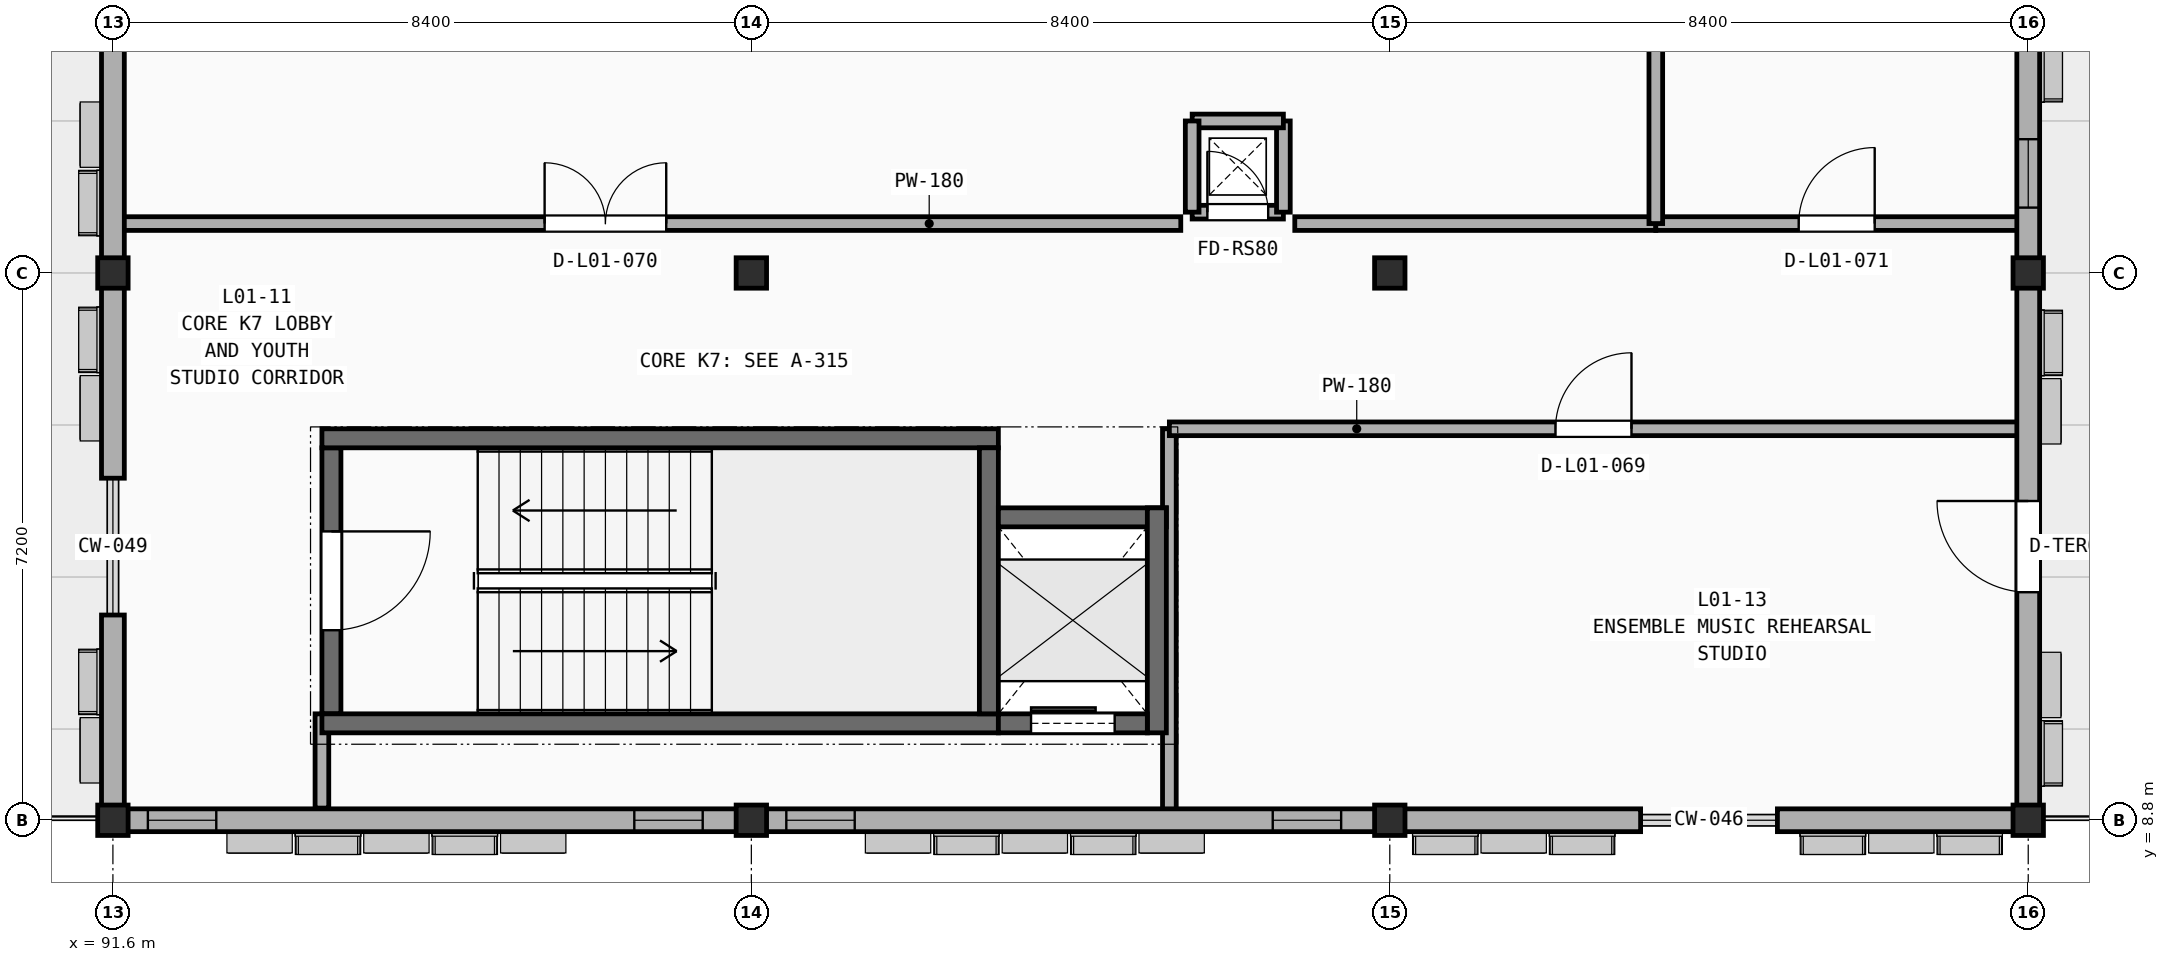
"""IFC4 building model, lengths in metres.
Left out: names, types, materials, properties, quantities, classifications, styles, units other than length and angle.
Written with IfcOpenShell. Run it as: python <this file> out.ifc"""

import sys

from ifc_helpers import new_model, si_unit, direction, frame, frame_2d, origin, origin_2d, place, context, subcontext, project, spatial, rectangle, extrude, element, fill, save


model = new_model("IFC4")
c1 = context("Model", 3, precision=1e-05, world=origin(), true_north=direction((0.0, 1.0)))
c2 = subcontext(c1, "Body", "Model", "MODEL_VIEW")
j1 = project(units=[si_unit("LENGTHUNIT", "METRE"), si_unit("PLANEANGLEUNIT", "RADIAN")], contexts=[c1])
p1 = place(None, origin())
s1 = spatial("IfcSite", under=j1, at=p1, CompositionType="ELEMENT")
p2 = place(p1, origin())
s2 = spatial("IfcBuilding", under=s1, at=p2, CompositionType="ELEMENT")
p3 = place(p2, frame((0.0, 0.0, 5.4)))
s3 = spatial("IfcBuildingStorey", under=s2, at=p3, CompositionType="ELEMENT", Elevation=5.4)
for number, where, z_axis, x_axis in (
    (1, (91.6, 8.8, 0.0), (0.0, 0.0, 1.0), (1.0, 0.0, 0.0)),
    (2, (91.6, 16.0, 0.0), (0.0, 0.0, 1.0), (1.0, 0.0, 0.0)),
    (3, (100.0, 8.8, 0.0), (0.0, 0.0, 1.0), (1.0, 0.0, 0.0)),
    (4, (100.0, 16.0, 0.0), (0.0, 0.0, 1.0), (1.0, 0.0, 0.0)),
    (5, (108.4, 8.8, 0.0), (0.0, 0.0, 1.0), (1.0, 0.0, 0.0)),
    (6, (108.4, 16.0, 0.0), (0.0, 0.0, 1.0), (1.0, 0.0, 0.0)),
    (7, (116.8, 8.8, 0.0), (0.0, 0.0, 1.0), (1.0, 0.0, 0.0)),
    (8, (116.8, 16.0, 0.0), (0.0, 0.0, 1.0), (1.0, 0.0, 0.0)),
):
    element("IfcColumn", number, at=place(p3, frame(where, z_axis=z_axis, x_axis=x_axis)), inside=s3, PredefinedType="COLUMN", context=c2, shape_type="SweptSolid", body=[
        extrude(rectangle(XDim=0.4, YDim=0.4, at=origin_2d()), origin(), (0.0, 0.0, 1.0), 4.2),
    ])
p4 = place(p3, frame((94.35, 8.96, 0.0), z_axis=(0.0, 0.0, 1.0), x_axis=(0.0, 1.0, 0.0)))
e9 = element("IfcWall", 9, at=p4, inside=s3, PredefinedType="PARTITIONING", context=c2, shape_type="SweptSolid", body=[
    extrude(rectangle(XDim=1.24, YDim=0.18, at=frame_2d((0.62, 0.0))), origin(), (0.0, 0.0, 1.0), 3.52),
])
p5 = place(p3, frame((105.5, 8.94, 0.0), z_axis=(0.0, 0.0, 1.0), x_axis=(0.0, 1.0, 0.0)))
e10 = element("IfcWall", 10, at=p5, inside=s3, PredefinedType="PARTITIONING", context=c2, shape_type="SweptSolid", body=[
    extrude(rectangle(XDim=5.01, YDim=0.18, at=frame_2d((2.505, 0.0))), origin(), (0.0, 0.0, 1.0), 3.52),
])
p6 = place(p3, frame((105.5, 13.95, 0.0), z_axis=(0.0, 0.0, 1.0), x_axis=(1.0, 0.0, 0.0)))
e11 = element("IfcWall", 11, at=p6, inside=s3, PredefinedType="PARTITIONING", context=c2, shape_type="SweptSolid", body=[
    extrude(rectangle(XDim=11.16, YDim=0.18, at=frame_2d((5.58, 0.0))), origin(), (0.0, 0.0, 1.0), 3.21),
])
p7 = place(p6, frame((5.08, 0.0, -0.01)))
e12 = element("IfcOpeningElement", 12, at=p7, cuts=e11, PredefinedType="OPENING", context=c2, shape_type="SweptSolid", body=[
    extrude(rectangle(XDim=1.0, YDim=2.16, at=frame_2d((0.5, 1.08))), frame((0.0, 0.1, 0.0), z_axis=(0.0, -1.0, 0.0), x_axis=(1.0, 0.0, 0.0)), (0.0, 0.0, 1.0), 0.2),
])
p8 = place(p3, frame((91.74, 16.65, 0.0), z_axis=(0.0, 0.0, 1.0), x_axis=(1.0, 0.0, 0.0)))
e13 = element("IfcWall", 13, at=p8, inside=s3, PredefinedType="PARTITIONING", context=c2, shape_type="SweptSolid", body=[
    extrude(rectangle(XDim=13.91, YDim=0.18, at=frame_2d((6.955, 0.0))), origin(), (0.0, 0.0, 1.0), 3.21),
])
p9 = place(p8, frame((5.54, 0.0, -0.01)))
e14 = element("IfcOpeningElement", 14, at=p9, cuts=e13, PredefinedType="OPENING", context=c2, shape_type="SweptSolid", body=[
    extrude(rectangle(XDim=1.6, YDim=2.21, at=frame_2d((0.8, 1.105))), frame((0.0, 0.1, 0.0), z_axis=(0.0, -1.0, 0.0), x_axis=(1.0, 0.0, 0.0)), (0.0, 0.0, 1.0), 0.2),
])
p10 = place(p3, frame((107.15, 16.65, 0.0), z_axis=(0.0, 0.0, 1.0), x_axis=(1.0, 0.0, 0.0)))
e15 = element("IfcWall", 15, at=p10, inside=s3, PredefinedType="PARTITIONING", context=c2, shape_type="SweptSolid", body=[
    extrude(rectangle(XDim=4.75, YDim=0.18, at=frame_2d((2.375, 0.0))), origin(), (0.0, 0.0, 1.0), 3.37),
])
p11 = place(p3, frame((111.9, 16.65, 0.0), z_axis=(0.0, 0.0, 1.0), x_axis=(1.0, 0.0, 0.0)))
e16 = element("IfcWall", 16, at=p11, inside=s3, PredefinedType="PARTITIONING", context=c2, shape_type="SweptSolid", body=[
    extrude(rectangle(XDim=4.76, YDim=0.18, at=frame_2d((2.38, 0.0))), origin(), (0.0, 0.0, 1.0), 3.21),
])
p12 = place(p11, frame((1.88, 0.0, -0.01)))
e17 = element("IfcOpeningElement", 17, at=p12, cuts=e16, PredefinedType="OPENING", context=c2, shape_type="SweptSolid", body=[
    extrude(rectangle(XDim=1.0, YDim=2.16, at=frame_2d((0.5, 1.08))), frame((0.0, 0.1, 0.0), z_axis=(0.0, -1.0, 0.0), x_axis=(1.0, 0.0, 0.0)), (0.0, 0.0, 1.0), 0.2),
])
p13 = place(p3, frame((111.9, 16.65, 0.0), z_axis=(0.0, 0.0, 1.0), x_axis=(0.0, 1.0, 0.0)))
e18 = element("IfcWall", 18, at=p13, inside=s3, PredefinedType="PARTITIONING", context=c2, shape_type="SweptSolid", body=[
    extrude(rectangle(XDim=6.41, YDim=0.18, at=frame_2d((3.205, 0.0))), origin(), (0.0, 0.0, 1.0), 3.52),
])
p14 = place(p3, frame((91.6, 8.8, 0.0), z_axis=(0.0, 0.0, 1.0), x_axis=(1.0, 0.0, 0.0)))
e19 = element("IfcWall", 19, at=p14, inside=s3, PredefinedType="SOLIDWALL", context=c2, shape_type="SweptSolid", body=[
    extrude(rectangle(XDim=8.4, YDim=0.3, at=frame_2d((4.2, 0.0))), origin(), (0.0, 0.0, 1.0), 3.21),
])
p15 = place(p14, frame((0.46, 0.0, 0.85)))
e20 = element("IfcOpeningElement", 20, at=p15, cuts=e19, PredefinedType="OPENING", context=c2, shape_type="SweptSolid", body=[
    extrude(rectangle(XDim=0.9, YDim=2.15, at=frame_2d((0.45, 1.075))), frame((0.0, 0.16, 0.0), z_axis=(0.0, -1.0, 0.0), x_axis=(1.0, 0.0, 0.0)), (0.0, 0.0, 1.0), 0.32),
])
p16 = place(p14, frame((6.86, 0.0, 0.85)))
e21 = element("IfcOpeningElement", 21, at=p16, cuts=e19, PredefinedType="OPENING", context=c2, shape_type="SweptSolid", body=[
    extrude(rectangle(XDim=0.9, YDim=2.15, at=frame_2d((0.45, 1.075))), frame((0.0, 0.16, 0.0), z_axis=(0.0, -1.0, 0.0), x_axis=(1.0, 0.0, 0.0)), (0.0, 0.0, 1.0), 0.32),
])
p17 = place(p3, frame((100.0, 8.8, 0.0), z_axis=(0.0, 0.0, 1.0), x_axis=(1.0, 0.0, 0.0)))
e22 = element("IfcWall", 22, at=p17, inside=s3, PredefinedType="SOLIDWALL", context=c2, shape_type="SweptSolid", body=[
    extrude(rectangle(XDim=8.4, YDim=0.3, at=frame_2d((4.2, 0.0))), origin(), (0.0, 0.0, 1.0), 3.37),
])
p18 = place(p17, frame((0.46, 0.0, 0.85)))
e23 = element("IfcOpeningElement", 23, at=p18, cuts=e22, PredefinedType="OPENING", context=c2, shape_type="SweptSolid", body=[
    extrude(rectangle(XDim=0.9, YDim=2.15, at=frame_2d((0.45, 1.075))), frame((0.0, 0.16, 0.0), z_axis=(0.0, -1.0, 0.0), x_axis=(1.0, 0.0, 0.0)), (0.0, 0.0, 1.0), 0.32),
])
p19 = place(p17, frame((6.86, 0.0, 0.85)))
e24 = element("IfcOpeningElement", 24, at=p19, cuts=e22, PredefinedType="OPENING", context=c2, shape_type="SweptSolid", body=[
    extrude(rectangle(XDim=0.9, YDim=2.15, at=frame_2d((0.45, 1.075))), frame((0.0, 0.16, 0.0), z_axis=(0.0, -1.0, 0.0), x_axis=(1.0, 0.0, 0.0)), (0.0, 0.0, 1.0), 0.32),
])
for number, where, z_axis, x_axis in (
    (25, (108.4, 8.8, 0.0), (0.0, 0.0, 1.0), (1.0, 0.0, 0.0)),
    (26, (113.5, 8.8, 0.0), (0.0, 0.0, 1.0), (1.0, 0.0, 0.0)),
):
    element("IfcWall", number, at=place(p3, frame(where, z_axis=z_axis, x_axis=x_axis)), inside=s3, PredefinedType="SOLIDWALL", context=c2, shape_type="SweptSolid", body=[
        extrude(rectangle(XDim=3.3, YDim=0.3, at=frame_2d((1.65, 0.0))), origin(), (0.0, 0.0, 1.0), 3.21),
    ])
for number, where, z_axis, x_axis in (
    (27, (91.6, 16.0, 0.0), (0.0, 0.0, 1.0), (0.0, -1.0, 0.0)),
    (28, (91.6, 11.5, 0.0), (0.0, 0.0, 1.0), (0.0, -1.0, 0.0)),
):
    element("IfcWall", number, at=place(p3, frame(where, z_axis=z_axis, x_axis=x_axis)), inside=s3, PredefinedType="SOLIDWALL", context=c2, shape_type="SweptSolid", body=[
        extrude(rectangle(XDim=2.7, YDim=0.3, at=frame_2d((1.35, 0.0))), origin(), (0.0, 0.0, 1.0), 3.21),
    ])
p20 = place(p3, frame((91.6, 23.2, 0.0), z_axis=(0.0, 0.0, 1.0), x_axis=(0.0, -1.0, 0.0)))
e29 = element("IfcWall", 29, at=p20, inside=s3, PredefinedType="SOLIDWALL", context=c2, shape_type="SweptSolid", body=[
    extrude(rectangle(XDim=7.2, YDim=0.3, at=frame_2d((3.6, 0.0))), origin(), (0.0, 0.0, 1.0), 3.21),
])
p21 = place(p20, frame((3.0, 0.0, -0.01)))
e30 = element("IfcOpeningElement", 30, at=p21, cuts=e29, PredefinedType="OPENING", context=c2, shape_type="SweptSolid", body=[
    extrude(rectangle(XDim=1.2, YDim=2.21, at=frame_2d((0.6, 1.105))), frame((0.0, 0.16, 0.0), z_axis=(0.0, -1.0, 0.0), x_axis=(1.0, 0.0, 0.0)), (0.0, 0.0, 1.0), 0.32),
])
p22 = place(p3, frame((116.8, 8.8, 0.0), z_axis=(0.0, 0.0, 1.0), x_axis=(0.0, 1.0, 0.0)))
e31 = element("IfcWall", 31, at=p22, inside=s3, PredefinedType="SOLIDWALL", context=c2, shape_type="SweptSolid", body=[
    extrude(rectangle(XDim=7.2, YDim=0.3, at=frame_2d((3.6, 0.0))), origin(), (0.0, 0.0, 1.0), 3.21),
])
p23 = place(p22, frame((3.0, 0.0, -0.01)))
e32 = element("IfcOpeningElement", 32, at=p23, cuts=e31, PredefinedType="OPENING", context=c2, shape_type="SweptSolid", body=[
    extrude(rectangle(XDim=1.2, YDim=2.21, at=frame_2d((0.6, 1.105))), frame((0.0, 0.16, 0.0), z_axis=(0.0, -1.0, 0.0), x_axis=(1.0, 0.0, 0.0)), (0.0, 0.0, 1.0), 0.32),
])
p24 = place(p3, frame((116.8, 16.0, 0.0), z_axis=(0.0, 0.0, 1.0), x_axis=(0.0, 1.0, 0.0)))
e33 = element("IfcWall", 33, at=p24, inside=s3, PredefinedType="SOLIDWALL", context=c2, shape_type="SweptSolid", body=[
    extrude(rectangle(XDim=7.2, YDim=0.3, at=frame_2d((3.6, 0.0))), origin(), (0.0, 0.0, 1.0), 3.21),
])
p25 = place(p24, frame((0.86, 0.0, 0.85)))
e34 = element("IfcOpeningElement", 34, at=p25, cuts=e33, PredefinedType="OPENING", context=c2, shape_type="SweptSolid", body=[
    extrude(rectangle(XDim=0.9, YDim=2.15, at=frame_2d((0.45, 1.075))), frame((0.0, 0.16, 0.0), z_axis=(0.0, -1.0, 0.0), x_axis=(1.0, 0.0, 0.0)), (0.0, 0.0, 1.0), 0.32),
])
p26 = place(p24, frame((5.66, 0.0, 0.85)))
e35 = element("IfcOpeningElement", 35, at=p26, cuts=e33, PredefinedType="OPENING", context=c2, shape_type="SweptSolid", body=[
    extrude(rectangle(XDim=0.9, YDim=2.15, at=frame_2d((0.45, 1.075))), frame((0.0, 0.16, 0.0), z_axis=(0.0, -1.0, 0.0), x_axis=(1.0, 0.0, 0.0)), (0.0, 0.0, 1.0), 0.32),
])
p27 = place(p3, frame((94.475, 13.7, 0.0), z_axis=(0.0, 0.0, 1.0), x_axis=(0.0, -1.0, 0.0)))
e36 = element("IfcWall", 36, at=p27, inside=s3, PredefinedType="SHEAR", context=c2, shape_type="SweptSolid", body=[
    extrude(rectangle(XDim=3.5, YDim=0.25, at=frame_2d((1.75, 0.0))), origin(), (0.0, 0.0, 1.0), 4.2),
])
p28 = place(p27, frame((1.1, 0.0, -0.01)))
e37 = element("IfcOpeningElement", 37, at=p28, cuts=e36, PredefinedType="OPENING", context=c2, shape_type="SweptSolid", body=[
    extrude(rectangle(XDim=1.3, YDim=2.16, at=frame_2d((0.65, 1.08))), frame((0.0, 0.135, 0.0), z_axis=(0.0, -1.0, 0.0), x_axis=(1.0, 0.0, 0.0)), (0.0, 0.0, 1.0), 0.27),
])
for number, where, z_axis, x_axis in (
    (38, (94.35, 10.075, 0.0), (0.0, 0.0, 1.0), (1.0, 0.0, 0.0)),
    (39, (94.35, 13.825, 0.0), (0.0, 0.0, 1.0), (1.0, 0.0, 0.0)),
):
    element("IfcWall", number, at=place(p3, frame(where, z_axis=z_axis, x_axis=x_axis)), inside=s3, PredefinedType="SHEAR", context=c2, shape_type="SweptSolid", body=[
        extrude(rectangle(XDim=8.9, YDim=0.25, at=frame_2d((4.45, 0.0))), origin(), (0.0, 0.0, 1.0), 4.2),
    ])
p29 = place(p3, frame((103.125, 10.2, 0.0), z_axis=(0.0, 0.0, 1.0), x_axis=(0.0, 1.0, 0.0)))
e40 = element("IfcWall", 40, at=p29, inside=s3, PredefinedType="SHEAR", context=c2, shape_type="SweptSolid", body=[
    extrude(rectangle(XDim=3.5, YDim=0.25, at=frame_2d((1.75, 0.0))), origin(), (0.0, 0.0, 1.0), 4.2),
])
p30 = place(p3, frame((103.25, 12.785, 0.0), z_axis=(0.0, 0.0, 1.0), x_axis=(1.0, 0.0, 0.0)))
e41 = element("IfcWall", 41, at=p30, inside=s3, PredefinedType="SHEAR", context=c2, shape_type="SweptSolid", body=[
    extrude(rectangle(XDim=2.21, YDim=0.25, at=frame_2d((1.105, 0.0))), origin(), (0.0, 0.0, 1.0), 4.2),
])
p31 = place(p3, frame((105.335, 9.95, 0.0), z_axis=(0.0, 0.0, 1.0), x_axis=(0.0, 1.0, 0.0)))
e42 = element("IfcWall", 42, at=p31, inside=s3, PredefinedType="SHEAR", context=c2, shape_type="SweptSolid", body=[
    extrude(rectangle(XDim=2.96, YDim=0.25, at=frame_2d((1.48, 0.0))), origin(), (0.0, 0.0, 1.0), 4.2),
])
p32 = place(p3, frame((103.25, 10.075, 0.0), z_axis=(0.0, 0.0, 1.0), x_axis=(1.0, 0.0, 0.0)))
e43 = element("IfcWall", 43, at=p32, inside=s3, PredefinedType="SHEAR", context=c2, shape_type="SweptSolid", body=[
    extrude(rectangle(XDim=1.96, YDim=0.25, at=frame_2d((0.98, 0.0))), origin(), (0.0, 0.0, 1.0), 4.2),
])
p33 = place(p32, frame((0.43, 0.0, -0.01)))
e44 = element("IfcOpeningElement", 44, at=p33, cuts=e43, PredefinedType="OPENING", context=c2, shape_type="SweptSolid", body=[
    extrude(rectangle(XDim=1.1, YDim=2.16, at=frame_2d((0.55, 1.08))), frame((0.0, 0.135, 0.0), z_axis=(0.0, -1.0, 0.0), x_axis=(1.0, 0.0, 0.0)), (0.0, 0.0, 1.0), 0.27),
])
p34 = place(p3, frame((105.8, 16.8, 0.0), z_axis=(0.0, 0.0, 1.0), x_axis=(1.0, 0.0, 0.0)))
e45 = element("IfcWall", 45, at=p34, inside=s3, PredefinedType="SOLIDWALL", context=c2, shape_type="SweptSolid", body=[
    extrude(rectangle(XDim=1.2, YDim=0.18, at=frame_2d((0.6, 0.0))), origin(), (0.0, 0.0, 1.0), 3.97),
])
p35 = place(p34, frame((0.2, 0.0, -0.01)))
e46 = element("IfcOpeningElement", 46, at=p35, cuts=e45, PredefinedType="OPENING", context=c2, shape_type="SweptSolid", body=[
    extrude(rectangle(XDim=0.8, YDim=2.06, at=frame_2d((0.4, 1.03))), frame((0.0, 0.1, 0.0), z_axis=(0.0, -1.0, 0.0), x_axis=(1.0, 0.0, 0.0)), (0.0, 0.0, 1.0), 0.2),
])
for number, where, z_axis, x_axis in (
    (47, (107.0, 16.8, 0.0), (0.0, 0.0, 1.0), (0.0, 1.0, 0.0)),
    (48, (107.0, 18.0, 0.0), (0.0, 0.0, 1.0), (-1.0, 0.0, 0.0)),
    (49, (105.8, 18.0, 0.0), (0.0, 0.0, 1.0), (0.0, -1.0, 0.0)),
):
    element("IfcWall", number, at=place(p3, frame(where, z_axis=z_axis, x_axis=x_axis)), inside=s3, PredefinedType="SOLIDWALL", context=c2, shape_type="SweptSolid", body=[
        extrude(rectangle(XDim=1.2, YDim=0.18, at=frame_2d((0.6, 0.0))), origin(), (0.0, 0.0, 1.0), 3.97),
    ])
p36 = place(p7, frame((1.0, 0.0, 0.01), z_axis=(0.0, 0.0, 1.0), x_axis=(-1.0, 0.0, 0.0)))
e50 = element("IfcDoor", 50, at=p36, inside=s3, OperationType="SINGLE_SWING_RIGHT", PredefinedType="DOOR", context=c2, shape_type="SweptSolid", body=[
    extrude(rectangle(XDim=1.0, YDim=2.15, at=frame_2d((0.5, 1.075))), frame((0.0, 0.025, 0.0), z_axis=(0.0, -1.0, 0.0), x_axis=(1.0, 0.0, 0.0)), (0.0, 0.0, 1.0), 0.05),
])
fill(e12, e50)
p37 = place(p9, frame((0.0, 0.0, 0.01)))
e51 = element("IfcDoor", 51, at=p37, inside=s3, OperationType="DOUBLE_SWING_LEFT", PredefinedType="DOOR", context=c2, shape_type="SweptSolid", body=[
    extrude(rectangle(XDim=1.6, YDim=2.2, at=frame_2d((0.8, 1.1))), frame((0.0, 0.025, 0.0), z_axis=(0.0, -1.0, 0.0), x_axis=(1.0, 0.0, 0.0)), (0.0, 0.0, 1.0), 0.05),
])
fill(e14, e51)
p38 = place(p12, frame((0.0, 0.0, 0.01)))
e52 = element("IfcDoor", 52, at=p38, inside=s3, OperationType="SINGLE_SWING_RIGHT", PredefinedType="DOOR", context=c2, shape_type="SweptSolid", body=[
    extrude(rectangle(XDim=1.0, YDim=2.15, at=frame_2d((0.5, 1.075))), frame((0.0, 0.025, 0.0), z_axis=(0.0, -1.0, 0.0), x_axis=(1.0, 0.0, 0.0)), (0.0, 0.0, 1.0), 0.05),
])
fill(e17, e52)
p39 = place(p15, origin())
e53 = element("IfcWindow", 53, at=p39, inside=s3, PartitioningType="SINGLE_PANEL", PredefinedType="WINDOW", context=c2, shape_type="SweptSolid", body=[
    extrude(rectangle(XDim=0.9, YDim=2.15, at=frame_2d((0.45, 1.075))), frame((0.0, 0.03, 0.0), z_axis=(0.0, -1.0, 0.0), x_axis=(1.0, 0.0, 0.0)), (0.0, 0.0, 1.0), 0.06),
])
fill(e20, e53)
p40 = place(p16, origin())
e54 = element("IfcWindow", 54, at=p40, inside=s3, PartitioningType="SINGLE_PANEL", PredefinedType="WINDOW", context=c2, shape_type="SweptSolid", body=[
    extrude(rectangle(XDim=0.9, YDim=2.15, at=frame_2d((0.45, 1.075))), frame((0.0, 0.03, 0.0), z_axis=(0.0, -1.0, 0.0), x_axis=(1.0, 0.0, 0.0)), (0.0, 0.0, 1.0), 0.06),
])
fill(e21, e54)
p41 = place(p18, origin())
e55 = element("IfcWindow", 55, at=p41, inside=s3, PartitioningType="SINGLE_PANEL", PredefinedType="WINDOW", context=c2, shape_type="SweptSolid", body=[
    extrude(rectangle(XDim=0.9, YDim=2.15, at=frame_2d((0.45, 1.075))), frame((0.0, 0.03, 0.0), z_axis=(0.0, -1.0, 0.0), x_axis=(1.0, 0.0, 0.0)), (0.0, 0.0, 1.0), 0.06),
])
fill(e23, e55)
p42 = place(p19, origin())
e56 = element("IfcWindow", 56, at=p42, inside=s3, PartitioningType="SINGLE_PANEL", PredefinedType="WINDOW", context=c2, shape_type="SweptSolid", body=[
    extrude(rectangle(XDim=0.9, YDim=2.15, at=frame_2d((0.45, 1.075))), frame((0.0, 0.03, 0.0), z_axis=(0.0, -1.0, 0.0), x_axis=(1.0, 0.0, 0.0)), (0.0, 0.0, 1.0), 0.06),
])
fill(e24, e56)
p43 = place(p23, frame((0.0, 0.0, 0.01)))
e57 = element("IfcDoor", 57, at=p43, inside=s3, OperationType="SINGLE_SWING_RIGHT", PredefinedType="DOOR", context=c2, shape_type="SweptSolid", body=[
    extrude(rectangle(XDim=1.2, YDim=2.2, at=frame_2d((0.6, 1.1))), frame((0.0, 0.025, 0.0), z_axis=(0.0, -1.0, 0.0), x_axis=(1.0, 0.0, 0.0)), (0.0, 0.0, 1.0), 0.05),
])
fill(e32, e57)
p44 = place(p25, origin())
e58 = element("IfcWindow", 58, at=p44, inside=s3, PartitioningType="SINGLE_PANEL", PredefinedType="WINDOW", context=c2, shape_type="SweptSolid", body=[
    extrude(rectangle(XDim=0.9, YDim=2.15, at=frame_2d((0.45, 1.075))), frame((0.0, 0.03, 0.0), z_axis=(0.0, -1.0, 0.0), x_axis=(1.0, 0.0, 0.0)), (0.0, 0.0, 1.0), 0.06),
])
fill(e34, e58)
p45 = place(p28, frame((1.3, 0.0, 0.01), z_axis=(0.0, 0.0, 1.0), x_axis=(-1.0, 0.0, 0.0)))
e59 = element("IfcDoor", 59, at=p45, inside=s3, OperationType="SINGLE_SWING_LEFT", PredefinedType="DOOR", context=c2, shape_type="SweptSolid", body=[
    extrude(rectangle(XDim=1.3, YDim=2.15, at=frame_2d((0.65, 1.075))), frame((0.0, 0.025, 0.0), z_axis=(0.0, -1.0, 0.0), x_axis=(1.0, 0.0, 0.0)), (0.0, 0.0, 1.0), 0.05),
])
fill(e37, e59)
p46 = place(p33, frame((0.0, 0.0, 0.01)))
e60 = element("IfcDoor", 60, at=p46, inside=s3, OperationType="SLIDING_TO_LEFT", PredefinedType="DOOR", context=c2, shape_type="SweptSolid", body=[
    extrude(rectangle(XDim=1.1, YDim=2.15, at=frame_2d((0.55, 1.075))), frame((0.0, 0.025, 0.0), z_axis=(0.0, -1.0, 0.0), x_axis=(1.0, 0.0, 0.0)), (0.0, 0.0, 1.0), 0.05),
])
fill(e44, e60)
p47 = place(p35, frame((0.0, 0.0, 0.01)))
e61 = element("IfcDoor", 61, at=p47, inside=s3, OperationType="SINGLE_SWING_LEFT", PredefinedType="DOOR", context=c2, shape_type="SweptSolid", body=[
    extrude(rectangle(XDim=0.8, YDim=2.05, at=frame_2d((0.4, 1.025))), frame((0.0, 0.025, 0.0), z_axis=(0.0, -1.0, 0.0), x_axis=(1.0, 0.0, 0.0)), (0.0, 0.0, 1.0), 0.05),
])
fill(e46, e61)
save(model, sys.argv[1])
